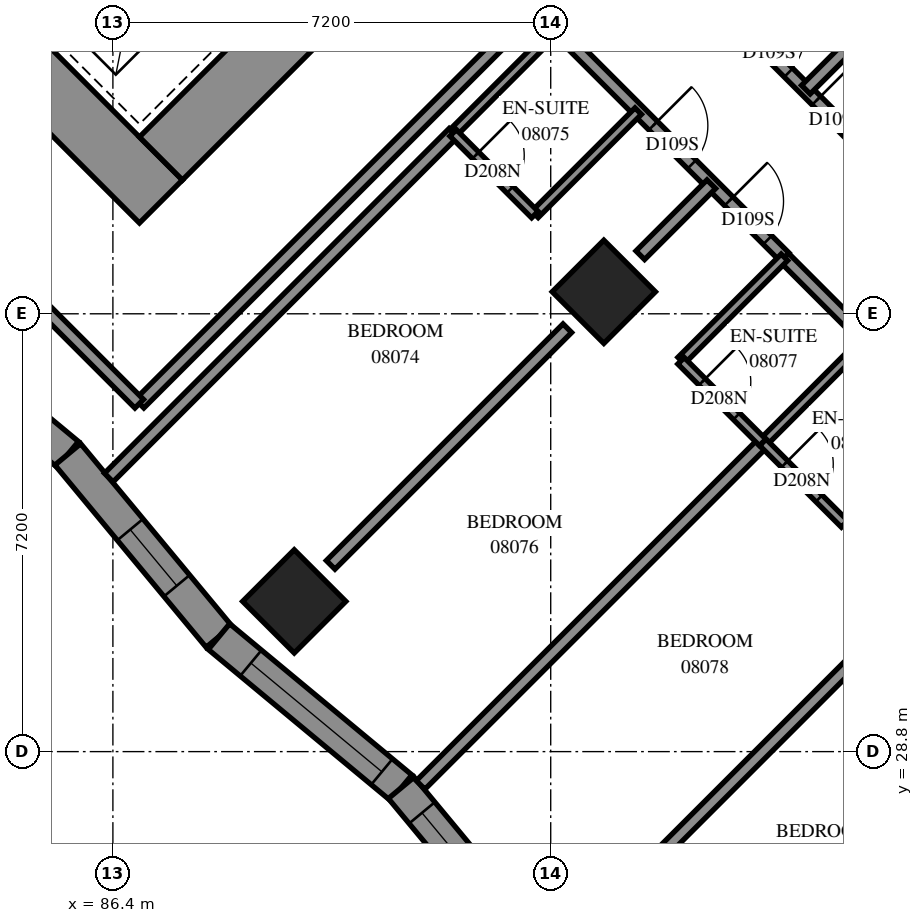
"""IFC4 building model, lengths in metres.
Left out: names, types, materials, properties, quantities, classifications, styles, units other than length and angle.
Written with IfcOpenShell. Run it as: python <this file> out.ifc"""

import sys

from ifc_helpers import new_model, si_unit, direction, frame, frame_2d, origin, origin_2d, place, context, subcontext, project, spatial, polyline, rectangle, outline, extrude, element, fill, save


model = new_model("IFC4")
c1 = context("Model", 3, precision=1e-05, world=origin(), true_north=direction((0.0, 1.0)))
c2 = subcontext(c1, "Body", "Model", "MODEL_VIEW")
j1 = project(units=[si_unit("LENGTHUNIT", "METRE"), si_unit("PLANEANGLEUNIT", "RADIAN")], contexts=[c1])
p1 = place(None, origin())
s1 = spatial("IfcSite", under=j1, at=p1, CompositionType="ELEMENT")
p2 = place(p1, origin())
s2 = spatial("IfcBuilding", under=s1, at=p2, CompositionType="ELEMENT")
p3 = place(p2, frame((0.0, 0.0, 33.8)))
s3 = spatial("IfcBuildingStorey", under=s2, at=p3, CompositionType="ELEMENT", Elevation=33.8)
for number, where, z_axis, x_axis in (
    (1, (94.474, 36.362, 0.0), (0.0, 0.0, 1.0), (0.707, -0.707, 0.0)),
    (2, (89.382, 31.271, 0.0), (0.0, 0.0, 1.0), (0.707, -0.707, 0.0)),
):
    element("IfcColumn", number, at=place(p3, frame(where, z_axis=z_axis, x_axis=x_axis)), inside=s3, PredefinedType="COLUMN", context=c2, shape_type="SweptSolid", body=[
        extrude(rectangle(XDim=1.2, YDim=1.2, at=origin_2d()), origin(), (0.0, 0.0, 1.0), 3.1),
    ])
p4 = place(p3, frame((75.594, 49.443, -0.3), z_axis=(0.0, 0.0, 1.0), x_axis=(0.7071037324, -0.70710983, 0.0)))
e3 = element("IfcWall", 3, at=p4, inside=s3, PredefinedType="SHEAR", context=c2, shape_type="SweptSolid", body=[
    extrude(rectangle(XDim=16.4, YDim=1.0, at=frame_2d((8.2, 0.0))), origin(), (0.0, 0.0, 1.0), 2.7),
])
p5 = place(p3, frame((87.19, 38.554, -0.3), z_axis=(0.0, 0.0, 1.0), x_axis=(0.707103309, 0.7071102534, 0.0)))
e4 = element("IfcWall", 4, at=p5, inside=s3, PredefinedType="SHEAR", context=c2, shape_type="SweptSolid", body=[
    extrude(rectangle(XDim=14.4, YDim=1.0, at=frame_2d((7.2, 0.0))), origin(), (0.0, 0.0, 1.0), 2.7),
])
p6 = place(p5, frame((4.55, 0.0, 0.3)))
e5 = element("IfcOpeningElement", 5, at=p6, cuts=e4, PredefinedType="OPENING", context=c2, shape_type="SweptSolid", body=[
    extrude(rectangle(XDim=1.1, YDim=2.1, at=frame_2d((0.55, 1.05))), frame((0.0, 0.51, 0.0), z_axis=(0.0, -1.0, 0.0), x_axis=(1.0, 0.0, 0.0)), (0.0, 0.0, 1.0), 1.02),
])
p7 = place(p5, frame((11.35, 0.0, 0.3)))
e6 = element("IfcOpeningElement", 6, at=p7, cuts=e4, PredefinedType="OPENING", context=c2, shape_type="SweptSolid", body=[
    extrude(rectangle(XDim=1.1, YDim=2.1, at=frame_2d((0.55, 1.05))), frame((0.0, 0.51, 0.0), z_axis=(0.0, -1.0, 0.0), x_axis=(1.0, 0.0, 0.0)), (0.0, 0.0, 1.0), 1.02),
])
p8 = place(p3, frame((82.661, 36.175, 0.0), z_axis=(0.0, 0.0, 1.0), x_axis=(0.7696065296, -0.6385184333, 0.0)))
e7 = element("IfcWall", 7, at=p8, inside=s3, PredefinedType="SOLIDWALL", context=c2, shape_type="SweptSolid", body=[
    extrude(outline(polyline([(-0.026, -0.275), (3.869, -0.275), (3.92, 0.275), (0.026, 0.275), (-0.026, -0.275)])), origin(), (0.0, 0.0, 1.0), 3.1),
])
p9 = place(p8, frame((1.76, 0.0, 0.5)))
e8 = element("IfcOpeningElement", 8, at=p9, cuts=e7, PredefinedType="OPENING", context=c2, shape_type="SweptSolid", body=[
    extrude(rectangle(XDim=1.2, YDim=2.45, at=frame_2d((0.6, 1.225))), frame((0.0, 0.285, 0.0), z_axis=(0.0, -1.0, 0.0), x_axis=(1.0, 0.0, 0.0)), (0.0, 0.0, 1.0), 0.57),
])
p10 = place(p3, frame((85.658, 33.688, 0.0), z_axis=(0.0, 0.0, 1.0), x_axis=(0.6385184333, -0.7696065296, 0.0)))
e9 = element("IfcWall", 9, at=p10, inside=s3, PredefinedType="SOLIDWALL", context=c2, shape_type="SweptSolid", body=[
    extrude(outline(polyline([(0.026, -0.275), (3.92, -0.275), (3.869, 0.275), (-0.026, 0.275), (0.026, -0.275)])), origin(), (0.0, 0.0, 1.0), 3.1),
])
p11 = place(p10, frame((1.607, 0.0, 0.5)))
e10 = element("IfcOpeningElement", 10, at=p11, cuts=e9, PredefinedType="OPENING", context=c2, shape_type="SweptSolid", body=[
    extrude(rectangle(XDim=1.2, YDim=2.45, at=frame_2d((0.6, 1.225))), frame((0.0, 0.285, 0.0), z_axis=(0.0, -1.0, 0.0), x_axis=(1.0, 0.0, 0.0)), (0.0, 0.0, 1.0), 0.57),
])
p12 = place(p3, frame((88.145, 30.691, 0.0), z_axis=(0.0, 0.0, 1.0), x_axis=(0.7696065296, -0.6385184333, 0.0)))
e11 = element("IfcWall", 11, at=p12, inside=s3, PredefinedType="SOLIDWALL", context=c2, shape_type="SweptSolid", body=[
    extrude(outline(polyline([(-0.026, -0.275), (3.869, -0.275), (3.92, 0.275), (0.026, 0.275), (-0.026, -0.275)])), origin(), (0.0, 0.0, 1.0), 3.1),
])
p13 = place(p12, frame((0.681, 0.0, 0.5)))
e12 = element("IfcOpeningElement", 12, at=p13, cuts=e11, PredefinedType="OPENING", context=c2, shape_type="SweptSolid", body=[
    extrude(rectangle(XDim=2.8, YDim=2.45, at=frame_2d((1.4, 1.225))), frame((0.0, 0.285, 0.0), z_axis=(0.0, -1.0, 0.0), x_axis=(1.0, 0.0, 0.0)), (0.0, 0.0, 1.0), 0.57),
])
p14 = place(p3, frame((91.142, 28.205, 0.0), z_axis=(0.0, 0.0, 1.0), x_axis=(0.6385184333, -0.7696065296, 0.0)))
e13 = element("IfcWall", 13, at=p14, inside=s3, PredefinedType="SOLIDWALL", context=c2, shape_type="SweptSolid", body=[
    extrude(outline(polyline([(0.026, -0.275), (3.92, -0.275), (3.869, 0.275), (-0.026, 0.275), (0.026, -0.275)])), origin(), (0.0, 0.0, 1.0), 3.1),
])
p15 = place(p14, frame((0.534, 0.0, 0.5)))
e14 = element("IfcOpeningElement", 14, at=p15, cuts=e13, PredefinedType="OPENING", context=c2, shape_type="SweptSolid", body=[
    extrude(rectangle(XDim=2.8, YDim=2.45, at=frame_2d((1.4, 1.225))), frame((0.0, 0.285, 0.0), z_axis=(0.0, -1.0, 0.0), x_axis=(1.0, 0.0, 0.0)), (0.0, 0.0, 1.0), 0.57),
])
p16 = place(p3, frame((94.895, 42.581, 0.0), z_axis=(0.0, 0.0, 1.0), x_axis=(0.7071067812, -0.7071067812, 0.0)))
e15 = element("IfcWall", 15, at=p16, inside=s3, PredefinedType="PARTITIONING", context=c2, shape_type="SweptSolid", body=[
    extrude(rectangle(XDim=14.9, YDim=0.2, at=frame_2d((7.45, 0.0))), origin(), (0.0, 0.0, 1.0), 3.1),
])
p17 = place(p16, frame((2.8, 0.0, 0.0)))
e16 = element("IfcOpeningElement", 16, at=p17, cuts=e15, PredefinedType="OPENING", context=c2, shape_type="SweptSolid", body=[
    extrude(rectangle(XDim=0.9, YDim=2.1, at=frame_2d((0.45, 1.05))), frame((0.0, 0.11, 0.0), z_axis=(0.0, -1.0, 0.0), x_axis=(1.0, 0.0, 0.0)), (0.0, 0.0, 1.0), 0.22),
])
p18 = place(p16, frame((4.348, 0.0, 0.0)))
e17 = element("IfcOpeningElement", 17, at=p18, cuts=e15, PredefinedType="OPENING", context=c2, shape_type="SweptSolid", body=[
    extrude(rectangle(XDim=0.9, YDim=2.1, at=frame_2d((0.45, 1.05))), frame((0.0, 0.11, 0.0), z_axis=(0.0, -1.0, 0.0), x_axis=(1.0, 0.0, 0.0)), (0.0, 0.0, 1.0), 0.22),
])
p19 = place(p16, frame((10.073, 0.0, 0.0)))
e18 = element("IfcOpeningElement", 18, at=p19, cuts=e15, PredefinedType="OPENING", context=c2, shape_type="SweptSolid", body=[
    extrude(rectangle(XDim=1.0, YDim=2.1, at=frame_2d((0.5, 1.05))), frame((0.0, 0.11, 0.0), z_axis=(0.0, -1.0, 0.0), x_axis=(1.0, 0.0, 0.0)), (0.0, 0.0, 1.0), 0.22),
])
p20 = place(p3, frame((86.838, 34.522, 0.0), z_axis=(0.0, 0.0, 1.0), x_axis=(0.7072154749, 0.7069980708, 0.0)))
e19 = element("IfcWall", 19, at=p20, inside=s3, PredefinedType="PARTITIONING", context=c2, shape_type="SweptSolid", body=[
    extrude(rectangle(XDim=9.2, YDim=0.2, at=frame_2d((4.6, 0.0))), origin(), (0.0, 0.0, 1.0), 3.1),
])
p21 = place(p3, frame((86.332, 33.307, 0.0), z_axis=(0.0, 0.0, 1.0), x_axis=(0.7069820292, 0.7072315112, 0.0)))
e20 = element("IfcWall", 20, at=p21, inside=s3, PredefinedType="PARTITIONING", context=c2, shape_type="SweptSolid", body=[
    extrude(rectangle(XDim=8.017, YDim=0.2, at=frame_2d((4.008, 0.0))), origin(), (0.0, 0.0, 1.0), 3.1),
])
p22 = place(p3, frame((96.536, 23.152, 0.0), z_axis=(0.0, 0.0, 1.0), x_axis=(0.7071067812, 0.7071067812, 0.0)))
e21 = element("IfcWall", 21, at=p22, inside=s3, PredefinedType="PARTITIONING", context=c2, shape_type="SweptSolid", body=[
    extrude(rectangle(XDim=7.983, YDim=0.2, at=frame_2d((3.991, 0.0))), origin(), (0.0, 0.0, 1.0), 3.1),
])
p23 = place(p3, frame((91.46, 28.252, 0.0), z_axis=(0.0, 0.0, 1.0), x_axis=(0.7072323194, 0.7069812206, 0.0)))
e22 = element("IfcWall", 22, at=p23, inside=s3, PredefinedType="PARTITIONING", context=c2, shape_type="SweptSolid", body=[
    extrude(rectangle(XDim=7.965, YDim=0.2, at=frame_2d((3.982, 0.0))), origin(), (0.0, 0.0, 1.0), 3.1),
])
p24 = place(p3, frame((102.531, 31.833, 0.0), z_axis=(0.0, 0.0, 1.0), x_axis=(-0.7070095491, 0.7072039999, 0.0)))
e23 = element("IfcWall", 23, at=p24, inside=s3, PredefinedType="PARTITIONING", context=c2, shape_type="SweptSolid", body=[
    extrude(rectangle(XDim=7.2, YDim=0.2, at=frame_2d((3.6, 0.0))), origin(), (0.0, 0.0, 1.0), 3.1),
])
p25 = place(p24, frame((2.165, 0.0, 0.0)))
e24 = element("IfcOpeningElement", 24, at=p25, cuts=e23, PredefinedType="OPENING", context=c2, shape_type="SweptSolid", body=[
    extrude(rectangle(XDim=0.9, YDim=2.1, at=frame_2d((0.45, 1.05))), frame((0.0, 0.11, 0.0), z_axis=(0.0, -1.0, 0.0), x_axis=(1.0, 0.0, 0.0)), (0.0, 0.0, 1.0), 0.22),
])
p26 = place(p24, frame((0.4, 0.0, 0.0)))
e25 = element("IfcOpeningElement", 25, at=p26, cuts=e23, PredefinedType="OPENING", context=c2, shape_type="SweptSolid", body=[
    extrude(rectangle(XDim=0.9, YDim=2.1, at=frame_2d((0.45, 1.05))), frame((0.0, 0.11, 0.0), z_axis=(0.0, -1.0, 0.0), x_axis=(1.0, 0.0, 0.0)), (0.0, 0.0, 1.0), 0.22),
])
p27 = place(p3, frame((89.981, 31.871, 0.0), z_axis=(0.0, 0.0, 1.0), x_axis=(0.7071067812, 0.7071067812, 0.0)))
e26 = element("IfcWall", 26, at=p27, inside=s3, PredefinedType="PARTITIONING", context=c2, shape_type="SweptSolid", body=[
    extrude(rectangle(XDim=5.504, YDim=0.2, at=frame_2d((2.752, 0.0))), origin(), (0.0, 0.0, 1.0), 3.1),
])
p28 = place(p3, frame((95.073, 26.781, 0.0), z_axis=(0.0, 0.0, 1.0), x_axis=(0.7071067812, 0.7071067812, 0.0)))
e27 = element("IfcWall", 27, at=p28, inside=s3, PredefinedType="PARTITIONING", context=c2, shape_type="SweptSolid", body=[
    extrude(rectangle(XDim=5.501, YDim=0.2, at=frame_2d((2.751, 0.0))), origin(), (0.0, 0.0, 1.0), 3.1),
])
p29 = place(p3, frame((93.699, 40.679, 0.0), z_axis=(0.0, 0.0, 1.0), x_axis=(0.7071067812, -0.7071067812, 0.0)))
e28 = element("IfcWall", 28, at=p29, inside=s3, PredefinedType="PARTITIONING", context=c2, shape_type="SweptSolid", body=[
    extrude(rectangle(XDim=5.301, YDim=0.2, at=frame_2d((2.65, 0.0))), origin(), (0.0, 0.0, 1.0), 3.1),
])
p30 = place(p29, frame((2.242, 0.0, 0.0)))
e29 = element("IfcOpeningElement", 29, at=p30, cuts=e28, PredefinedType="OPENING", context=c2, shape_type="SweptSolid", body=[
    extrude(rectangle(XDim=0.9, YDim=2.1, at=frame_2d((0.45, 1.05))), frame((0.0, 0.11, 0.0), z_axis=(0.0, -1.0, 0.0), x_axis=(1.0, 0.0, 0.0)), (0.0, 0.0, 1.0), 0.22),
])
p31 = place(p29, frame((4.002, 0.0, 0.0)))
e30 = element("IfcOpeningElement", 30, at=p31, cuts=e28, PredefinedType="OPENING", context=c2, shape_type="SweptSolid", body=[
    extrude(rectangle(XDim=0.9, YDim=2.1, at=frame_2d((0.45, 1.05))), frame((0.0, 0.11, 0.0), z_axis=(0.0, -1.0, 0.0), x_axis=(1.0, 0.0, 0.0)), (0.0, 0.0, 1.0), 0.22),
])
p32 = place(p3, frame((84.889, 36.465, 0.0), z_axis=(0.0, 0.0, 1.0), x_axis=(0.7071067812, -0.7071067812, 0.0)))
e31 = element("IfcWall", 31, at=p32, inside=s3, PredefinedType="PARTITIONING", context=c2, shape_type="SweptSolid", body=[
    extrude(rectangle(XDim=2.749, YDim=0.2, at=frame_2d((1.375, 0.0))), origin(), (0.0, 0.0, 1.0), 3.1),
])
for number, where, z_axis, x_axis in (
    (32, (93.341, 37.635, 0.0), (0.0, 0.0, 1.0), (0.707, 0.707, 0.0)),
    (33, (95.745, 35.231, 0.0), (0.0, 0.0, 1.0), (0.707, 0.707, 0.0)),
    (34, (91.997, 38.979, 0.0), (0.0, 0.0, 1.0), (0.707, 0.707, 0.0)),
):
    element("IfcWall", number, at=place(p3, frame(where, z_axis=z_axis, x_axis=x_axis)), inside=s3, PredefinedType="PARTITIONING", context=c2, shape_type="SweptSolid", body=[
        extrude(rectangle(XDim=2.401, YDim=0.15, at=frame_2d((1.201, 0.0))), origin(), (0.0, 0.0, 1.0), 3.1),
    ])
p33 = place(p3, frame((97.092, 33.884, 0.0), z_axis=(0.0, 0.0, 1.0), x_axis=(0.706689978, 0.7075233388, 0.0)))
e35 = element("IfcWall", 35, at=p33, inside=s3, PredefinedType="PARTITIONING", context=c2, shape_type="SweptSolid", body=[
    extrude(rectangle(XDim=2.4, YDim=0.15, at=frame_2d((1.2, 0.0))), origin(), (0.0, 0.0, 1.0), 3.1),
])
p34 = place(p3, frame((98.433, 32.545, 0.0), z_axis=(0.0, 0.0, 1.0), x_axis=(0.7071067812, 0.7071067812, 0.0)))
e36 = element("IfcWall", 36, at=p34, inside=s3, PredefinedType="PARTITIONING", context=c2, shape_type="SweptSolid", body=[
    extrude(rectangle(XDim=2.398, YDim=0.15, at=frame_2d((1.199, 0.0))), origin(), (0.0, 0.0, 1.0), 3.1),
])
p35 = place(p3, frame((95.743, 35.227, 0.0), z_axis=(0.0, 0.0, 1.0), x_axis=(0.7071067812, -0.7071067812, 0.0)))
e37 = element("IfcWall", 37, at=p35, inside=s3, PredefinedType="PARTITIONING", context=c2, shape_type="SweptSolid", body=[
    extrude(rectangle(XDim=1.901, YDim=0.15, at=frame_2d((0.95, 0.0))), origin(), (0.0, 0.0, 1.0), 3.1),
])
p36 = place(p35, frame((0.491, 0.0, 0.0)))
e38 = element("IfcOpeningElement", 38, at=p36, cuts=e37, PredefinedType="OPENING", context=c2, shape_type="SweptSolid", body=[
    extrude(rectangle(XDim=0.8, YDim=2.1, at=frame_2d((0.4, 1.05))), frame((0.0, 0.085, 0.0), z_axis=(0.0, -1.0, 0.0), x_axis=(1.0, 0.0, 0.0)), (0.0, 0.0, 1.0), 0.17),
])
p37 = place(p3, frame((91.995, 38.975, 0.0), z_axis=(0.0, 0.0, 1.0), x_axis=(0.7071067812, -0.7071067812, 0.0)))
e39 = element("IfcWall", 39, at=p37, inside=s3, PredefinedType="PARTITIONING", context=c2, shape_type="SweptSolid", body=[
    extrude(rectangle(XDim=1.901, YDim=0.15, at=frame_2d((0.95, 0.0))), origin(), (0.0, 0.0, 1.0), 3.1),
])
p38 = place(p37, frame((0.523, 0.0, 0.0)))
e40 = element("IfcOpeningElement", 40, at=p38, cuts=e39, PredefinedType="OPENING", context=c2, shape_type="SweptSolid", body=[
    extrude(rectangle(XDim=0.8, YDim=2.1, at=frame_2d((0.4, 1.05))), frame((0.0, 0.085, 0.0), z_axis=(0.0, -1.0, 0.0), x_axis=(1.0, 0.0, 0.0)), (0.0, 0.0, 1.0), 0.17),
])
p39 = place(p3, frame((97.09, 33.886, 0.0), z_axis=(0.0, 0.0, 1.0), x_axis=(0.7076330979, -0.7065800724, 0.0)))
e41 = element("IfcWall", 41, at=p39, inside=s3, PredefinedType="PARTITIONING", context=c2, shape_type="SweptSolid", body=[
    extrude(rectangle(XDim=1.899, YDim=0.15, at=frame_2d((0.95, 0.0))), origin(), (0.0, 0.0, 1.0), 3.1),
])
p40 = place(p39, frame((0.504, 0.0, 0.0)))
e42 = element("IfcOpeningElement", 42, at=p40, cuts=e41, PredefinedType="OPENING", context=c2, shape_type="SweptSolid", body=[
    extrude(rectangle(XDim=0.8, YDim=2.1, at=frame_2d((0.4, 1.05))), frame((0.0, 0.085, 0.0), z_axis=(0.0, -1.0, 0.0), x_axis=(1.0, 0.0, 0.0)), (0.0, 0.0, 1.0), 0.17),
])
for number, where, z_axis, x_axis in (
    (43, (97.796, 39.686, 0.0), (0.0, 0.0, 1.0), (0.707, 0.707, 0.0)),
    (44, (95.073, 36.963, 0.0), (0.0, 0.0, 1.0), (0.707, 0.707, 0.0)),
):
    element("IfcWall", number, at=place(p3, frame(where, z_axis=z_axis, x_axis=x_axis)), inside=s3, PredefinedType="PARTITIONING", context=c2, shape_type="SweptSolid", body=[
        extrude(rectangle(XDim=1.652, YDim=0.2, at=frame_2d((0.826, 0.0))), origin(), (0.0, 0.0, 1.0), 3.1),
    ])
p41 = place(p11, origin())
e45 = element("IfcWindow", 45, at=p41, inside=s3, PartitioningType="SINGLE_PANEL", PredefinedType="WINDOW", context=c2, shape_type="SweptSolid", body=[
    extrude(rectangle(XDim=1.2, YDim=2.45, at=frame_2d((0.6, 1.225))), frame((0.0, 0.155, 0.0), z_axis=(0.0, -1.0, 0.0), x_axis=(1.0, 0.0, 0.0)), (0.0, 0.0, 1.0), 0.06),
])
fill(e10, e45)
p42 = place(p13, origin())
e46 = element("IfcWindow", 46, at=p42, inside=s3, PartitioningType="SINGLE_PANEL", PredefinedType="WINDOW", context=c2, shape_type="SweptSolid", body=[
    extrude(rectangle(XDim=2.8, YDim=2.45, at=frame_2d((1.4, 1.225))), frame((0.0, 0.155, 0.0), z_axis=(0.0, -1.0, 0.0), x_axis=(1.0, 0.0, 0.0)), (0.0, 0.0, 1.0), 0.06),
])
fill(e12, e46)
p43 = place(p15, origin())
e47 = element("IfcWindow", 47, at=p43, inside=s3, PartitioningType="SINGLE_PANEL", PredefinedType="WINDOW", context=c2, shape_type="SweptSolid", body=[
    extrude(rectangle(XDim=2.8, YDim=2.45, at=frame_2d((1.4, 1.225))), frame((0.0, 0.155, 0.0), z_axis=(0.0, -1.0, 0.0), x_axis=(1.0, 0.0, 0.0)), (0.0, 0.0, 1.0), 0.06),
])
fill(e14, e47)
p44 = place(p17, origin())
e48 = element("IfcDoor", 48, at=p44, inside=s3, OperationType="SINGLE_SWING_RIGHT", PredefinedType="DOOR", context=c2, shape_type="SweptSolid", body=[
    extrude(rectangle(XDim=0.9, YDim=2.1, at=frame_2d((0.45, 1.05))), frame((0.0, 0.025, 0.0), z_axis=(0.0, -1.0, 0.0), x_axis=(1.0, 0.0, 0.0)), (0.0, 0.0, 1.0), 0.05),
])
fill(e16, e48)
p45 = place(p18, origin())
e49 = element("IfcDoor", 49, at=p45, inside=s3, OperationType="SINGLE_SWING_LEFT", PredefinedType="DOOR", context=c2, shape_type="SweptSolid", body=[
    extrude(rectangle(XDim=0.9, YDim=2.1, at=frame_2d((0.45, 1.05))), frame((0.0, 0.025, 0.0), z_axis=(0.0, -1.0, 0.0), x_axis=(1.0, 0.0, 0.0)), (0.0, 0.0, 1.0), 0.05),
])
fill(e17, e49)
p46 = place(p30, origin())
e50 = element("IfcDoor", 50, at=p46, inside=s3, OperationType="SINGLE_SWING_LEFT", PredefinedType="DOOR", context=c2, shape_type="SweptSolid", body=[
    extrude(rectangle(XDim=0.9, YDim=2.1, at=frame_2d((0.45, 1.05))), frame((0.0, 0.025, 0.0), z_axis=(0.0, -1.0, 0.0), x_axis=(1.0, 0.0, 0.0)), (0.0, 0.0, 1.0), 0.05),
])
fill(e29, e50)
p47 = place(p38, origin())
e51 = element("IfcDoor", 51, at=p47, inside=s3, OperationType="SINGLE_SWING_RIGHT", PredefinedType="DOOR", context=c2, shape_type="SweptSolid", body=[
    extrude(rectangle(XDim=0.8, YDim=2.1, at=frame_2d((0.4, 1.05))), frame((0.0, 0.025, 0.0), z_axis=(0.0, -1.0, 0.0), x_axis=(1.0, 0.0, 0.0)), (0.0, 0.0, 1.0), 0.05),
])
fill(e40, e51)
p48 = place(p31, origin())
e52 = element("IfcDoor", 52, at=p48, inside=s3, OperationType="SINGLE_SWING_RIGHT", PredefinedType="DOOR", context=c2, shape_type="SweptSolid", body=[
    extrude(rectangle(XDim=0.9, YDim=2.1, at=frame_2d((0.45, 1.05))), frame((0.0, 0.025, 0.0), z_axis=(0.0, -1.0, 0.0), x_axis=(1.0, 0.0, 0.0)), (0.0, 0.0, 1.0), 0.05),
])
fill(e30, e52)
p49 = place(p36, origin())
e53 = element("IfcDoor", 53, at=p49, inside=s3, OperationType="SINGLE_SWING_RIGHT", PredefinedType="DOOR", context=c2, shape_type="SweptSolid", body=[
    extrude(rectangle(XDim=0.8, YDim=2.1, at=frame_2d((0.4, 1.05))), frame((0.0, 0.025, 0.0), z_axis=(0.0, -1.0, 0.0), x_axis=(1.0, 0.0, 0.0)), (0.0, 0.0, 1.0), 0.05),
])
fill(e38, e53)
p50 = place(p40, origin())
e54 = element("IfcDoor", 54, at=p50, inside=s3, OperationType="SINGLE_SWING_RIGHT", PredefinedType="DOOR", context=c2, shape_type="SweptSolid", body=[
    extrude(rectangle(XDim=0.8, YDim=2.1, at=frame_2d((0.4, 1.05))), frame((0.0, 0.025, 0.0), z_axis=(0.0, -1.0, 0.0), x_axis=(1.0, 0.0, 0.0)), (0.0, 0.0, 1.0), 0.05),
])
fill(e42, e54)
save(model, sys.argv[1])
